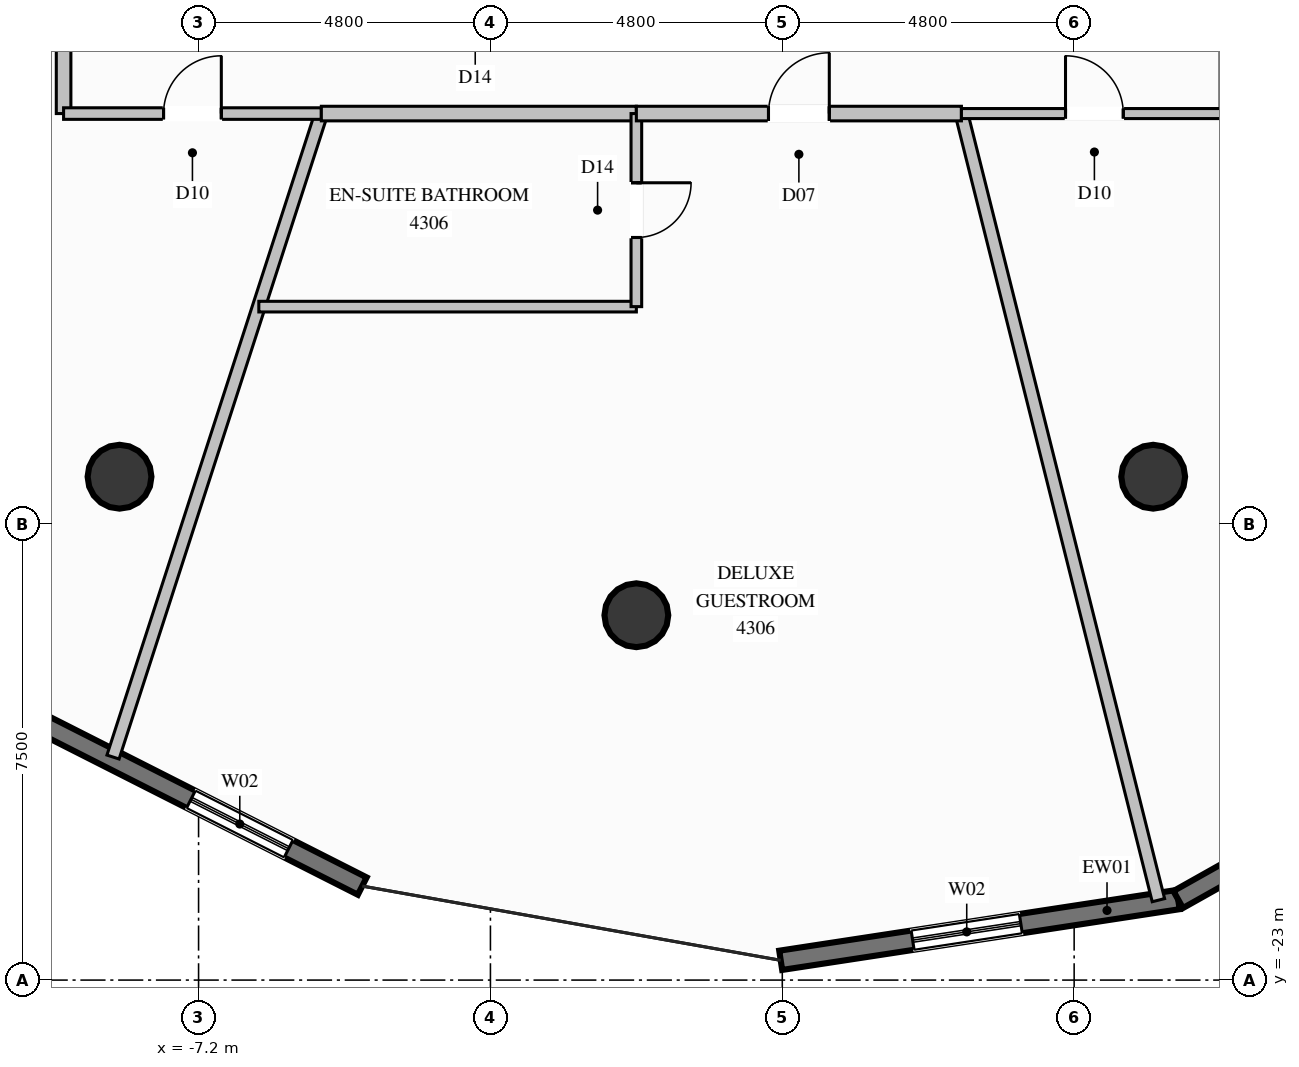
"""IFC4 building model, lengths in metres.
Left out: names, types, materials, properties, quantities, classifications, styles, units other than length and angle.
Written with IfcOpenShell. Run it as: python <this file> out.ifc"""

import sys

from ifc_helpers import new_model, si_unit, direction, frame, frame_2d, origin, origin_2d, place, context, subcontext, project, spatial, rectangle, circle, extrude, element, fill, save


model = new_model("IFC4")
c1 = context("Model", 3, precision=1e-05, world=origin(), true_north=direction((0.0, 1.0)))
c2 = subcontext(c1, "Body", "Model", "MODEL_VIEW")
j1 = project(units=[si_unit("LENGTHUNIT", "METRE"), si_unit("PLANEANGLEUNIT", "RADIAN")], contexts=[c1])
p1 = place(None, origin())
s1 = spatial("IfcSite", under=j1, at=p1, CompositionType="ELEMENT")
p2 = place(p1, origin())
s2 = spatial("IfcBuilding", under=s1, at=p2, CompositionType="ELEMENT")
p3 = place(p2, frame((0.0, 0.0, 160.2)))
s3 = spatial("IfcBuildingStorey", under=s2, at=p3, CompositionType="ELEMENT", Elevation=160.2)
for number, where, z_axis, x_axis in (
    (1, (-8.5, -14.722, 0.0), (0.0, 0.0, 1.0), (1.0, 0.0, 0.0)),
    (2, (0.0, -17.0, 0.0), (0.0, 0.0, 1.0), (1.0, 0.0, 0.0)),
    (3, (8.5, -14.722, 0.0), (0.0, 0.0, 1.0), (1.0, 0.0, 0.0)),
):
    element("IfcColumn", number, at=place(p3, frame(where, z_axis=z_axis, x_axis=x_axis)), inside=s3, PredefinedType="COLUMN", context=c2, shape_type="SweptSolid", body=[
        extrude(circle(Radius=0.525, at=origin_2d()), origin(), (0.0, 0.0, 1.0), 3.6),
    ])
p4 = place(p3, frame((-4.508, -21.454, 0.0), z_axis=(0.0, 0.0, 1.0), x_axis=(-0.892041671527, 0.451953157151, 0.0)))
e4 = element("IfcWall", 4, at=p4, inside=s3, PredefinedType="SOLIDWALL", context=c2, shape_type="SweptSolid", body=[
    extrude(rectangle(XDim=7.346, YDim=0.32, at=frame_2d((3.673, 0.0))), origin(), (0.0, 0.0, 1.0), 3.2),
])
p5 = place(p4, frame((1.358, 0.0, 0.35)))
e5 = element("IfcOpeningElement", 5, at=p5, cuts=e4, PredefinedType="OPENING", context=c2, shape_type="SweptSolid", body=[
    extrude(rectangle(XDim=1.8, YDim=2.6, at=frame_2d((0.9, 1.3))), frame((0.0, 0.17, 0.0), z_axis=(0.0, -1.0, 0.0), x_axis=(1.0, 0.0, 0.0)), (0.0, 0.0, 1.0), 0.34),
])
p6 = place(p3, frame((8.911, -21.676, 0.0), z_axis=(0.0, 0.0, 1.0), x_axis=(-0.988522302644, -0.151075005132, 0.0)))
e6 = element("IfcWall", 6, at=p6, inside=s3, PredefinedType="SOLIDWALL", context=c2, shape_type="SweptSolid", body=[
    extrude(rectangle(XDim=6.613, YDim=0.32, at=frame_2d((3.306, 0.0))), origin(), (0.0, 0.0, 1.0), 3.2),
])
p7 = place(p6, frame((2.618, 0.0, 0.35)))
e7 = element("IfcOpeningElement", 7, at=p7, cuts=e6, PredefinedType="OPENING", context=c2, shape_type="SweptSolid", body=[
    extrude(rectangle(XDim=1.8, YDim=2.6, at=frame_2d((0.9, 1.3))), frame((0.0, 0.17, 0.0), z_axis=(0.0, -1.0, 0.0), x_axis=(1.0, 0.0, 0.0)), (0.0, 0.0, 1.0), 0.34),
])
p8 = place(p3, frame((14.464, -18.555, 0.0), z_axis=(0.0, 0.0, 1.0), x_axis=(-0.871749481809, -0.489951876174, 0.0)))
e8 = element("IfcWall", 8, at=p8, inside=s3, PredefinedType="SOLIDWALL", context=c2, shape_type="SweptSolid", body=[
    extrude(rectangle(XDim=6.37, YDim=0.32, at=frame_2d((3.185, 0.0))), origin(), (0.0, 0.0, 1.0), 3.2),
])
p9 = place(p8, frame((2.285, 0.0, 0.35)))
e9 = element("IfcOpeningElement", 9, at=p9, cuts=e8, PredefinedType="OPENING", context=c2, shape_type="SweptSolid", body=[
    extrude(rectangle(XDim=1.8, YDim=2.6, at=frame_2d((0.9, 1.3))), frame((0.0, 0.17, 0.0), z_axis=(0.0, -1.0, 0.0), x_axis=(1.0, 0.0, 0.0)), (0.0, 0.0, 1.0), 0.34),
])
p10 = place(p3, frame((-9.42, -5.2, 0.0), z_axis=(0.0, 0.0, 1.0), x_axis=(-0.855762821872, -0.517368333687, 0.0)))
e10 = element("IfcWall", 10, at=p10, inside=s3, PredefinedType="PARTITIONING", context=c2, shape_type="SweptSolid", body=[
    extrude(rectangle(XDim=5.706, YDim=0.21, at=frame_2d((2.853, 0.0))), origin(), (0.0, 0.0, 1.0), 2.067),
])
p11 = place(p3, frame((-5.181, -8.75, 0.0), z_axis=(0.0, 0.0, 1.0), x_axis=(-0.308017807396, -0.951380591733, 0.0)))
e11 = element("IfcWall", 11, at=p11, inside=s3, PredefinedType="PARTITIONING", context=c2, shape_type="SweptSolid", body=[
    extrude(rectangle(XDim=11.123, YDim=0.21, at=frame_2d((5.562, 0.0))), origin(), (0.0, 0.0, 1.0), 2.067),
])
p12 = place(p3, frame((-9.42, -5.2, 0.0), z_axis=(0.0, 0.0, 1.0), x_axis=(0.0, -1.0, 0.0)))
e12 = element("IfcWall", 12, at=p12, inside=s3, PredefinedType="PARTITIONING", context=c2, shape_type="SweptSolid", body=[
    extrude(rectangle(XDim=3.55, YDim=0.24, at=frame_2d((1.775, 0.0))), origin(), (0.0, 0.0, 1.0), 3.2),
])
p13 = place(p3, frame((-9.42, -8.75, 0.0), z_axis=(0.0, 0.0, 1.0), x_axis=(1.0, 0.0, 0.0)))
e13 = element("IfcWall", 13, at=p13, inside=s3, PredefinedType="PARTITIONING", context=c2, shape_type="SweptSolid", body=[
    extrude(rectangle(XDim=4.239, YDim=0.19, at=frame_2d((2.12, 0.0))), origin(), (0.0, 0.0, 1.0), 3.2),
])
p14 = place(p13, frame((1.644, 0.0, 0.0)))
e14 = element("IfcOpeningElement", 14, at=p14, cuts=e13, PredefinedType="OPENING", context=c2, shape_type="SweptSolid", body=[
    extrude(rectangle(XDim=0.95, YDim=2.1, at=frame_2d((0.475, 1.05))), frame((0.0, 0.105, 0.0), z_axis=(0.0, -1.0, 0.0), x_axis=(1.0, 0.0, 0.0)), (0.0, 0.0, 1.0), 0.21),
])
p15 = place(p3, frame((-5.181, -8.75, 0.0), z_axis=(0.0, 0.0, 1.0), x_axis=(1.0, 0.0, 0.0)))
e15 = element("IfcWall", 15, at=p15, inside=s3, PredefinedType="PARTITIONING", context=c2, shape_type="SweptSolid", body=[
    extrude(rectangle(XDim=5.181, YDim=0.24, at=frame_2d((2.59, 0.0))), origin(), (0.0, 0.0, 1.0), 3.2),
])
p16 = place(p3, frame((-6.209, -11.925, 0.0), z_axis=(0.0, 0.0, 1.0), x_axis=(1.0, 0.0, 0.0)))
e16 = element("IfcWall", 16, at=p16, inside=s3, PredefinedType="PLUMBINGWALL", context=c2, shape_type="SweptSolid", body=[
    extrude(rectangle(XDim=6.209, YDim=0.175, at=frame_2d((3.104, 0.0))), origin(), (0.0, 0.0, 1.0), 3.2),
])
p17 = place(p3, frame((0.0, -8.75, 0.0), z_axis=(0.0, 0.0, 1.0), x_axis=(0.0, -1.0, 0.0)))
e17 = element("IfcWall", 17, at=p17, inside=s3, PredefinedType="PLUMBINGWALL", context=c2, shape_type="SweptSolid", body=[
    extrude(rectangle(XDim=3.175, YDim=0.175, at=frame_2d((1.587, 0.0))), origin(), (0.0, 0.0, 1.0), 2.067),
])
p18 = place(p17, frame((1.138, 0.0, 0.0)))
e18 = element("IfcOpeningElement", 18, at=p18, cuts=e17, PredefinedType="OPENING", context=c2, shape_type="SweptSolid", body=[
    extrude(rectangle(XDim=0.9, YDim=2.02, at=frame_2d((0.45, 1.01))), frame((0.0, 0.098, 0.0), z_axis=(0.0, -1.0, 0.0), x_axis=(1.0, 0.0, 0.0)), (0.0, 0.0, 1.0), 0.195),
])
p19 = place(p3, frame((5.346, -8.75, 0.0), z_axis=(0.0, 0.0, 1.0), x_axis=(0.242957749605, -0.970036871416, 0.0)))
e19 = element("IfcWall", 19, at=p19, inside=s3, PredefinedType="PARTITIONING", context=c2, shape_type="SweptSolid", body=[
    extrude(rectangle(XDim=13.336, YDim=0.21, at=frame_2d((6.668, 0.0))), origin(), (0.0, 0.0, 1.0), 2.067),
])
p20 = place(p3, frame((0.0, -8.75, 0.0), z_axis=(0.0, 0.0, 1.0), x_axis=(1.0, 0.0, 0.0)))
e20 = element("IfcWall", 20, at=p20, inside=s3, PredefinedType="PARTITIONING", context=c2, shape_type="SweptSolid", body=[
    extrude(rectangle(XDim=5.346, YDim=0.24, at=frame_2d((2.673, 0.0))), origin(), (0.0, 0.0, 1.0), 3.2),
])
p21 = place(p20, frame((2.173, 0.0, 0.0)))
e21 = element("IfcOpeningElement", 21, at=p21, cuts=e20, PredefinedType="OPENING", context=c2, shape_type="SweptSolid", body=[
    extrude(rectangle(XDim=1.0, YDim=2.2, at=frame_2d((0.5, 1.1))), frame((0.0, 0.13, 0.0), z_axis=(0.0, -1.0, 0.0), x_axis=(1.0, 0.0, 0.0)), (0.0, 0.0, 1.0), 0.26),
])
p22 = place(p3, frame((5.346, -8.75, 0.0), z_axis=(0.0, 0.0, 1.0), x_axis=(1.0, 0.0, 0.0)))
e22 = element("IfcWall", 22, at=p22, inside=s3, PredefinedType="PARTITIONING", context=c2, shape_type="SweptSolid", body=[
    extrude(rectangle(XDim=4.374, YDim=0.165, at=frame_2d((2.187, 0.0))), origin(), (0.0, 0.0, 1.0), 3.2),
])
p23 = place(p22, frame((1.712, 0.0, 0.0)))
e23 = element("IfcOpeningElement", 23, at=p23, cuts=e22, PredefinedType="OPENING", context=c2, shape_type="SweptSolid", body=[
    extrude(rectangle(XDim=0.95, YDim=2.1, at=frame_2d((0.475, 1.05))), frame((0.0, 0.093, 0.0), z_axis=(0.0, -1.0, 0.0), x_axis=(1.0, 0.0, 0.0)), (0.0, 0.0, 1.0), 0.185),
])
p24 = place(p5, origin())
e24 = element("IfcWindow", 24, at=p24, inside=s3, PartitioningType="SINGLE_PANEL", PredefinedType="WINDOW", context=c2, shape_type="SweptSolid", body=[
    extrude(rectangle(XDim=1.8, YDim=2.6, at=frame_2d((0.9, 1.3))), frame((0.0, 0.03, 0.0), z_axis=(0.0, -1.0, 0.0), x_axis=(1.0, 0.0, 0.0)), (0.0, 0.0, 1.0), 0.06),
])
fill(e5, e24)
p25 = place(p7, origin())
e25 = element("IfcWindow", 25, at=p25, inside=s3, PartitioningType="SINGLE_PANEL", PredefinedType="WINDOW", context=c2, shape_type="SweptSolid", body=[
    extrude(rectangle(XDim=1.8, YDim=2.6, at=frame_2d((0.9, 1.3))), frame((0.0, 0.03, 0.0), z_axis=(0.0, -1.0, 0.0), x_axis=(1.0, 0.0, 0.0)), (0.0, 0.0, 1.0), 0.06),
])
fill(e7, e25)
p26 = place(p14, origin())
e26 = element("IfcDoor", 26, at=p26, inside=s3, OperationType="SINGLE_SWING_RIGHT", PredefinedType="DOOR", context=c2, shape_type="SweptSolid", body=[
    extrude(rectangle(XDim=0.95, YDim=2.1, at=frame_2d((0.475, 1.05))), frame((0.0, 0.025, 0.0), z_axis=(0.0, -1.0, 0.0), x_axis=(1.0, 0.0, 0.0)), (0.0, 0.0, 1.0), 0.05),
])
fill(e14, e26)
p27 = place(p18, origin())
e27 = element("IfcDoor", 27, at=p27, inside=s3, OperationType="SINGLE_SWING_LEFT", PredefinedType="DOOR", context=c2, shape_type="SweptSolid", body=[
    extrude(rectangle(XDim=0.9, YDim=2.02, at=frame_2d((0.45, 1.01))), frame((0.0, 0.025, 0.0), z_axis=(0.0, -1.0, 0.0), x_axis=(1.0, 0.0, 0.0)), (0.0, 0.0, 1.0), 0.05),
])
fill(e18, e27)
p28 = place(p21, origin())
e28 = element("IfcDoor", 28, at=p28, inside=s3, OperationType="SINGLE_SWING_RIGHT", PredefinedType="DOOR", context=c2, shape_type="SweptSolid", body=[
    extrude(rectangle(XDim=1.0, YDim=2.2, at=frame_2d((0.5, 1.1))), frame((0.0, 0.025, 0.0), z_axis=(0.0, -1.0, 0.0), x_axis=(1.0, 0.0, 0.0)), (0.0, 0.0, 1.0), 0.05),
])
fill(e21, e28)
p29 = place(p23, origin())
e29 = element("IfcDoor", 29, at=p29, inside=s3, OperationType="SINGLE_SWING_LEFT", PredefinedType="DOOR", context=c2, shape_type="SweptSolid", body=[
    extrude(rectangle(XDim=0.95, YDim=2.1, at=frame_2d((0.475, 1.05))), frame((0.0, 0.025, 0.0), z_axis=(0.0, -1.0, 0.0), x_axis=(1.0, 0.0, 0.0)), (0.0, 0.0, 1.0), 0.05),
])
fill(e23, e29)
save(model, sys.argv[1])
